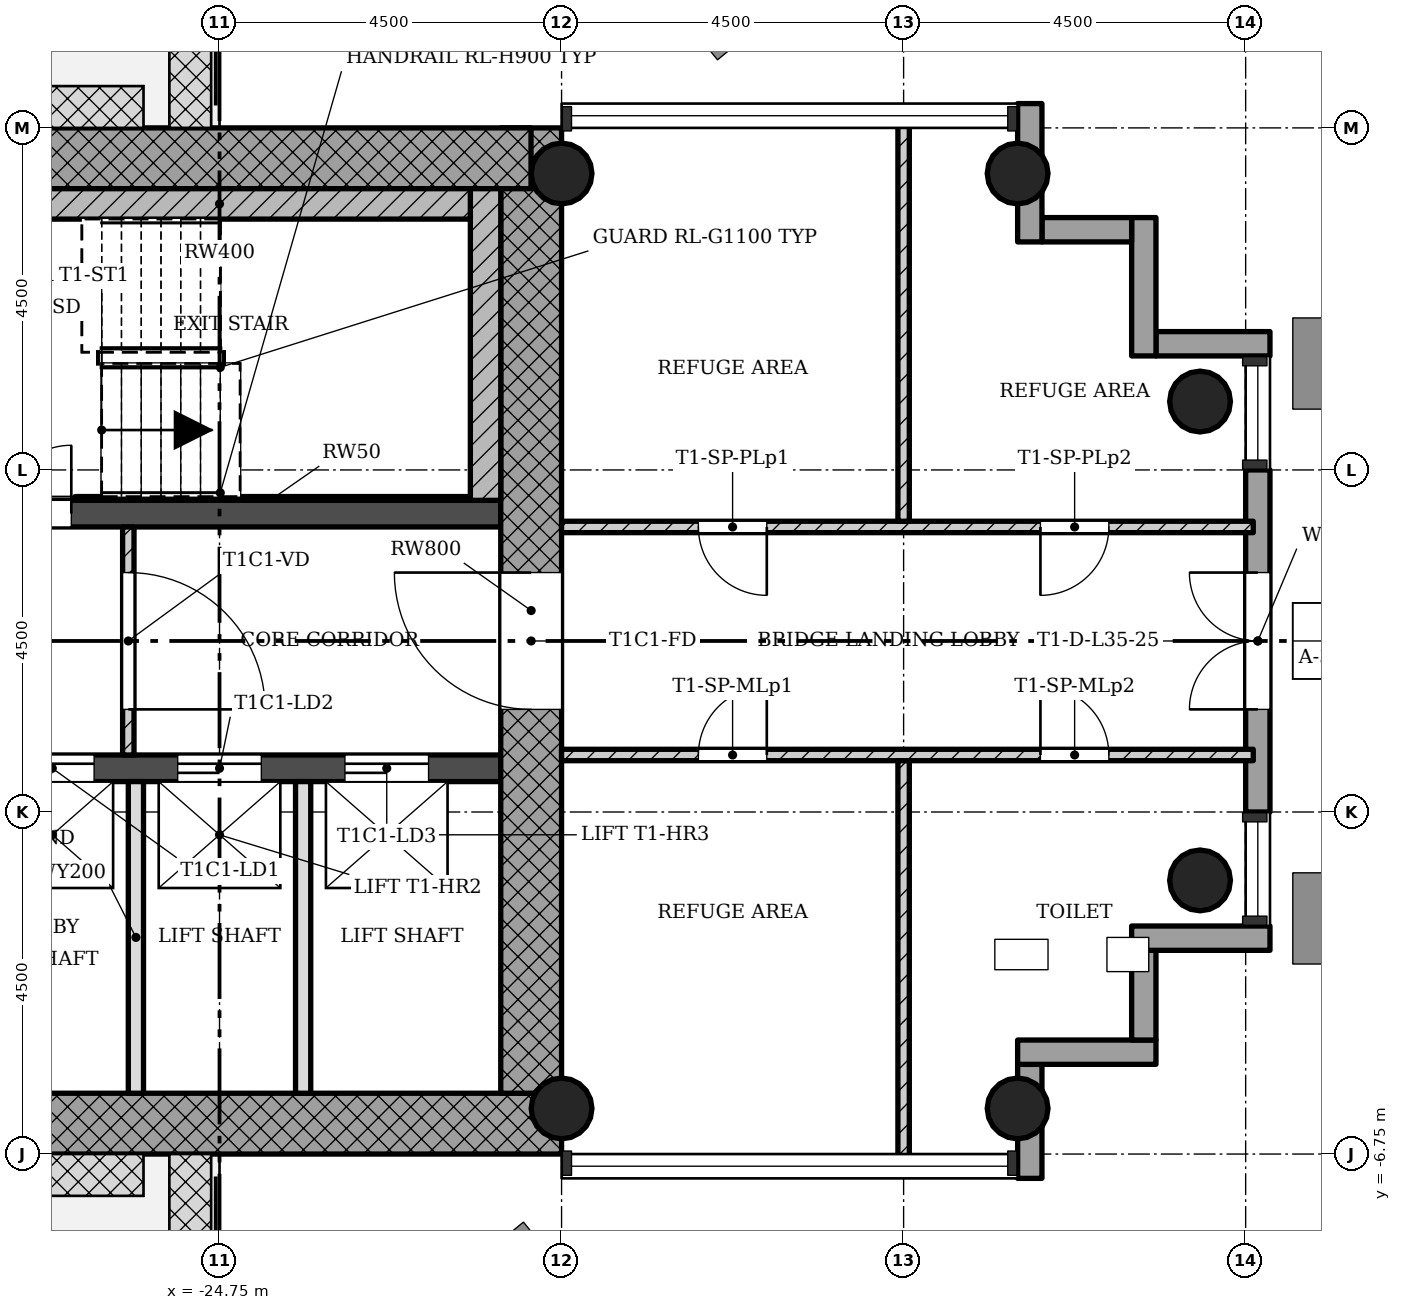
"""IFC4 building model, lengths in metres.
Left out: names, types, materials, properties, quantities, classifications, styles, units other than length and angle.
Written with IfcOpenShell. Run it as: python <this file> out.ifc"""

import sys

from ifc_helpers import new_model, si_unit, direction, frame, frame_2d, origin, origin_2d, place, context, subcontext, project, spatial, rectangle, hollow_circle, extrude, element, fill, save


model = new_model("IFC4")
c1 = context("Model", 3, precision=1e-05, world=origin(), true_north=direction((0.0, 1.0)))
c2 = subcontext(c1, "Body", "Model", "MODEL_VIEW")
j1 = project(units=[si_unit("LENGTHUNIT", "METRE"), si_unit("PLANEANGLEUNIT", "RADIAN")], contexts=[c1])
p1 = place(None, origin())
s1 = spatial("IfcSite", under=j1, at=p1, CompositionType="ELEMENT")
p2 = place(p1, origin())
s2 = spatial("IfcBuilding", under=s1, at=p2, CompositionType="ELEMENT")
p3 = place(p2, frame((0.0, 0.0, 128.7)))
s3 = spatial("IfcBuildingStorey", under=s2, at=p3, CompositionType="ELEMENT", Elevation=128.7)
p4 = place(p3, frame((-28.45, -6.35, 0.0), z_axis=(0.0, 0.0, 1.0), x_axis=(1.0, 0.0, 0.0)))
e1 = element("IfcWall", 1, at=p4, inside=s3, PredefinedType="SHEAR", context=c2, shape_type="SweptSolid", body=[
    extrude(rectangle(XDim=8.2, YDim=0.8, at=frame_2d((4.1, 0.0))), origin(), (0.0, 0.0, 1.0), 5.0),
])
p5 = place(p3, frame((-20.65, -5.95, 0.0), z_axis=(0.0, 0.0, 1.0), x_axis=(0.0, 1.0, 0.0)))
e2 = element("IfcWall", 2, at=p5, inside=s3, PredefinedType="SHEAR", context=c2, shape_type="SweptSolid", body=[
    extrude(rectangle(XDim=12.7, YDim=0.8, at=frame_2d((6.35, 0.0))), origin(), (0.0, 0.0, 1.0), 5.0),
])
p6 = place(p5, frame((5.05, 0.0, 0.0)))
e3 = element("IfcOpeningElement", 3, at=p6, cuts=e2, PredefinedType="OPENING", context=c2, shape_type="SweptSolid", body=[
    extrude(rectangle(XDim=1.8, YDim=2.1, at=frame_2d((0.9, 1.05))), frame((0.0, 0.41, 0.0), z_axis=(0.0, -1.0, 0.0), x_axis=(1.0, 0.0, 0.0)), (0.0, 0.0, 1.0), 0.82),
])
p7 = place(p3, frame((-20.652, 6.35, 0.0), z_axis=(0.0, 0.0, 1.0), x_axis=(-1.0, 0.0, 0.0)))
e4 = element("IfcWall", 4, at=p7, inside=s3, PredefinedType="SHEAR", context=c2, shape_type="SweptSolid", body=[
    extrude(rectangle(XDim=8.796, YDim=0.8, at=frame_2d((4.398, 0.0))), origin(), (0.0, 0.0, 1.0), 5.0),
])
p8 = place(p3, frame((-28.45, -1.675, 0.0), z_axis=(0.0, 0.0, 1.0), x_axis=(1.0, 0.0, 0.0)))
e5 = element("IfcWall", 5, at=p8, inside=s3, PredefinedType="SHEAR", context=c2, shape_type="SweptSolid", body=[
    extrude(rectangle(XDim=7.4, YDim=0.35, at=frame_2d((3.7, 0.0))), origin(), (0.0, 0.0, 1.0), 5.0),
])
p9 = place(p8, frame((0.95, 0.0, 0.0)))
e6 = element("IfcOpeningElement", 6, at=p9, cuts=e5, PredefinedType="OPENING", context=c2, shape_type="SweptSolid", body=[
    extrude(rectangle(XDim=1.1, YDim=2.1, at=frame_2d((0.55, 1.05))), frame((0.0, 0.185, 0.0), z_axis=(0.0, -1.0, 0.0), x_axis=(1.0, 0.0, 0.0)), (0.0, 0.0, 1.0), 0.37),
])
p10 = place(p8, frame((3.15, 0.0, 0.0)))
e7 = element("IfcOpeningElement", 7, at=p10, cuts=e5, PredefinedType="OPENING", context=c2, shape_type="SweptSolid", body=[
    extrude(rectangle(XDim=1.1, YDim=2.1, at=frame_2d((0.55, 1.05))), frame((0.0, 0.185, 0.0), z_axis=(0.0, -1.0, 0.0), x_axis=(1.0, 0.0, 0.0)), (0.0, 0.0, 1.0), 0.37),
])
p11 = place(p8, frame((5.35, 0.0, 0.0)))
e8 = element("IfcOpeningElement", 8, at=p11, cuts=e5, PredefinedType="OPENING", context=c2, shape_type="SweptSolid", body=[
    extrude(rectangle(XDim=1.1, YDim=2.1, at=frame_2d((0.55, 1.05))), frame((0.0, 0.185, 0.0), z_axis=(0.0, -1.0, 0.0), x_axis=(1.0, 0.0, 0.0)), (0.0, 0.0, 1.0), 0.37),
])
p12 = place(p3, frame((-28.45, 1.675, 0.0), z_axis=(0.0, 0.0, 1.0), x_axis=(1.0, 0.0, 0.0)))
e9 = element("IfcWall", 9, at=p12, inside=s3, PredefinedType="SHEAR", context=c2, shape_type="SweptSolid", body=[
    extrude(rectangle(XDim=7.4, YDim=0.35, at=frame_2d((3.7, 0.0))), origin(), (0.0, 0.0, 1.0), 5.0),
])
p13 = place(p12, frame((0.85, 0.0, 0.0)))
e10 = element("IfcOpeningElement", 10, at=p13, cuts=e9, PredefinedType="OPENING", context=c2, shape_type="SweptSolid", body=[
    extrude(rectangle(XDim=0.9, YDim=2.1, at=frame_2d((0.45, 1.05))), frame((0.0, 0.185, 0.0), z_axis=(0.0, -1.0, 0.0), x_axis=(1.0, 0.0, 0.0)), (0.0, 0.0, 1.0), 0.37),
])
for number, where, z_axis, x_axis in (
    (11, (-20.25, -6.15, 0.0), (0.0, 0.0, 1.0), (1.0, 0.0, 0.0)),
    (12, (-20.25, 6.15, 0.0), (0.0, 0.0, 1.0), (1.0, 0.0, 0.0)),
    (13, (-14.25, -6.15, 0.0), (0.0, 0.0, 1.0), (1.0, 0.0, 0.0)),
    (14, (-14.25, 6.15, 0.0), (0.0, 0.0, 1.0), (1.0, 0.0, 0.0)),
    (15, (-11.85, -3.15, 0.0), (0.0, 0.0, 1.0), (1.0, 0.0, 0.0)),
    (16, (-11.85, 3.15, 0.0), (0.0, 0.0, 1.0), (1.0, 0.0, 0.0)),
):
    element("IfcColumn", number, at=place(p3, frame(where, z_axis=z_axis, x_axis=x_axis)), inside=s3, PredefinedType="COLUMN", context=c2, shape_type="SweptSolid", body=[
        extrude(hollow_circle(Radius=0.4, WallThickness=0.028, at=origin_2d()), origin(), (0.0, 0.0, 1.0), 5.0),
    ])
p14 = place(p3, frame((-14.09, -7.07, -0.3), z_axis=(0.0, 0.0, 1.0), x_axis=(0.0, 1.0, 0.0)))
e17 = element("IfcWall", 17, at=p14, inside=s3, PredefinedType="STANDARD", context=c2, shape_type="SweptSolid", body=[
    extrude(rectangle(XDim=1.5, YDim=0.32, at=frame_2d((0.75, 0.0))), origin(), (0.0, 0.0, 1.0), 5.0),
])
p15 = place(p3, frame((-14.25, -5.41, -0.3), z_axis=(0.0, 0.0, 1.0), x_axis=(1.0, 0.0, 0.0)))
e18 = element("IfcWall", 18, at=p15, inside=s3, PredefinedType="STANDARD", context=c2, shape_type="SweptSolid", body=[
    extrude(rectangle(XDim=1.82, YDim=0.32, at=frame_2d((0.91, 0.0))), origin(), (0.0, 0.0, 1.0), 5.0),
])
p16 = place(p3, frame((-12.59, -5.25, -0.3), z_axis=(0.0, 0.0, 1.0), x_axis=(0.0, 1.0, 0.0)))
e19 = element("IfcWall", 19, at=p16, inside=s3, PredefinedType="STANDARD", context=c2, shape_type="SweptSolid", body=[
    extrude(rectangle(XDim=1.18, YDim=0.32, at=frame_2d((0.59, 0.0))), origin(), (0.0, 0.0, 1.0), 5.0),
])
p17 = place(p3, frame((-12.75, -3.91, -0.3), z_axis=(0.0, 0.0, 1.0), x_axis=(1.0, 0.0, 0.0)))
e20 = element("IfcWall", 20, at=p17, inside=s3, PredefinedType="STANDARD", context=c2, shape_type="SweptSolid", body=[
    extrude(rectangle(XDim=1.82, YDim=0.32, at=frame_2d((0.91, 0.0))), origin(), (0.0, 0.0, 1.0), 5.0),
])
p18 = place(p3, frame((-11.09, -2.25, 0.0), z_axis=(0.0, 0.0, 1.0), x_axis=(0.0, 1.0, 0.0)))
e21 = element("IfcWall", 21, at=p18, inside=s3, PredefinedType="STANDARD", context=c2, shape_type="SweptSolid", body=[
    extrude(rectangle(XDim=4.5, YDim=0.32, at=frame_2d((2.25, 0.0))), origin(), (0.0, 0.0, 1.0), 4.7),
])
p19 = place(p18, frame((1.35, 0.0, 0.0)))
e22 = element("IfcOpeningElement", 22, at=p19, cuts=e21, PredefinedType="OPENING", context=c2, shape_type="SweptSolid", body=[
    extrude(rectangle(XDim=1.8, YDim=2.1, at=frame_2d((0.9, 1.05))), frame((0.0, 0.17, 0.0), z_axis=(0.0, -1.0, 0.0), x_axis=(1.0, 0.0, 0.0)), (0.0, 0.0, 1.0), 0.34),
])
p20 = place(p3, frame((-10.93, 3.91, -0.3), z_axis=(0.0, 0.0, 1.0), x_axis=(-1.0, 0.0, 0.0)))
e23 = element("IfcWall", 23, at=p20, inside=s3, PredefinedType="STANDARD", context=c2, shape_type="SweptSolid", body=[
    extrude(rectangle(XDim=1.5, YDim=0.32, at=frame_2d((0.75, 0.0))), origin(), (0.0, 0.0, 1.0), 5.0),
])
p21 = place(p3, frame((-12.59, 3.75, -0.3), z_axis=(0.0, 0.0, 1.0), x_axis=(0.0, 1.0, 0.0)))
e24 = element("IfcWall", 24, at=p21, inside=s3, PredefinedType="STANDARD", context=c2, shape_type="SweptSolid", body=[
    extrude(rectangle(XDim=1.82, YDim=0.32, at=frame_2d((0.91, 0.0))), origin(), (0.0, 0.0, 1.0), 5.0),
])
p22 = place(p3, frame((-12.75, 5.41, -0.3), z_axis=(0.0, 0.0, 1.0), x_axis=(-1.0, 0.0, 0.0)))
e25 = element("IfcWall", 25, at=p22, inside=s3, PredefinedType="STANDARD", context=c2, shape_type="SweptSolid", body=[
    extrude(rectangle(XDim=1.18, YDim=0.32, at=frame_2d((0.59, 0.0))), origin(), (0.0, 0.0, 1.0), 5.0),
])
p23 = place(p3, frame((-14.09, 5.25, -0.3), z_axis=(0.0, 0.0, 1.0), x_axis=(0.0, 1.0, 0.0)))
e26 = element("IfcWall", 26, at=p23, inside=s3, PredefinedType="STANDARD", context=c2, shape_type="SweptSolid", body=[
    extrude(rectangle(XDim=1.82, YDim=0.32, at=frame_2d((0.91, 0.0))), origin(), (0.0, 0.0, 1.0), 5.0),
])
p24 = place(p3, frame((-25.95, -1.5, 0.0), z_axis=(0.0, 0.0, 1.0), x_axis=(0.0, 1.0, 0.0)))
e27 = element("IfcWall", 27, at=p24, inside=s3, PredefinedType="PARTITIONING", context=c2, shape_type="SweptSolid", body=[
    extrude(rectangle(XDim=3.0, YDim=0.15, at=frame_2d((1.5, 0.0))), origin(), (0.0, 0.0, 1.0), 4.58),
])
p25 = place(p24, frame((0.6, 0.0, 0.0)))
e28 = element("IfcOpeningElement", 28, at=p25, cuts=e27, PredefinedType="OPENING", context=c2, shape_type="SweptSolid", body=[
    extrude(rectangle(XDim=1.8, YDim=2.1, at=frame_2d((0.9, 1.05))), frame((0.0, 0.085, 0.0), z_axis=(0.0, -1.0, 0.0), x_axis=(1.0, 0.0, 0.0)), (0.0, 0.0, 1.0), 0.17),
])
for number, where, z_axis, x_axis in (
    (29, (-25.85, -5.95, 0.0), (0.0, 0.0, 1.0), (0.0, 1.0, 0.0)),
    (30, (-23.65, -5.95, 0.0), (0.0, 0.0, 1.0), (0.0, 1.0, 0.0)),
):
    element("IfcWall", number, at=place(p3, frame(where, z_axis=z_axis, x_axis=x_axis)), inside=s3, PredefinedType="SOLIDWALL", context=c2, shape_type="SweptSolid", body=[
        extrude(rectangle(XDim=4.1, YDim=0.2, at=frame_2d((2.05, 0.0))), origin(), (0.0, 0.0, 1.0), 4.58),
    ])
p26 = place(p3, frame((-20.25, 1.5, 0.0), z_axis=(0.0, 0.0, 1.0), x_axis=(1.0, 0.0, 0.0)))
e31 = element("IfcWall", 31, at=p26, inside=s3, PredefinedType="PARTITIONING", context=c2, shape_type="SweptSolid", body=[
    extrude(rectangle(XDim=9.1, YDim=0.15, at=frame_2d((4.55, 0.0))), origin(), (0.0, 0.0, 1.0), 4.58),
])
p27 = place(p26, frame((1.8, 0.0, 0.0)))
e32 = element("IfcOpeningElement", 32, at=p27, cuts=e31, PredefinedType="OPENING", context=c2, shape_type="SweptSolid", body=[
    extrude(rectangle(XDim=0.9, YDim=2.1, at=frame_2d((0.45, 1.05))), frame((0.0, 0.085, 0.0), z_axis=(0.0, -1.0, 0.0), x_axis=(1.0, 0.0, 0.0)), (0.0, 0.0, 1.0), 0.17),
])
p28 = place(p26, frame((6.3, 0.0, 0.0)))
e33 = element("IfcOpeningElement", 33, at=p28, cuts=e31, PredefinedType="OPENING", context=c2, shape_type="SweptSolid", body=[
    extrude(rectangle(XDim=0.9, YDim=2.1, at=frame_2d((0.45, 1.05))), frame((0.0, 0.085, 0.0), z_axis=(0.0, -1.0, 0.0), x_axis=(1.0, 0.0, 0.0)), (0.0, 0.0, 1.0), 0.17),
])
p29 = place(p3, frame((-15.75, 1.575, 0.0), z_axis=(0.0, 0.0, 1.0), x_axis=(0.0, 1.0, 0.0)))
e34 = element("IfcWall", 34, at=p29, inside=s3, PredefinedType="PARTITIONING", context=c2, shape_type="SweptSolid", body=[
    extrude(rectangle(XDim=5.275, YDim=0.15, at=frame_2d((2.638, 0.0))), origin(), (0.0, 0.0, 1.0), 4.58),
])
p30 = place(p3, frame((-20.25, -1.5, 0.0), z_axis=(0.0, 0.0, 1.0), x_axis=(1.0, 0.0, 0.0)))
e35 = element("IfcWall", 35, at=p30, inside=s3, PredefinedType="PARTITIONING", context=c2, shape_type="SweptSolid", body=[
    extrude(rectangle(XDim=9.1, YDim=0.15, at=frame_2d((4.55, 0.0))), origin(), (0.0, 0.0, 1.0), 4.58),
])
p31 = place(p30, frame((1.8, 0.0, 0.0)))
e36 = element("IfcOpeningElement", 36, at=p31, cuts=e35, PredefinedType="OPENING", context=c2, shape_type="SweptSolid", body=[
    extrude(rectangle(XDim=0.9, YDim=2.1, at=frame_2d((0.45, 1.05))), frame((0.0, 0.085, 0.0), z_axis=(0.0, -1.0, 0.0), x_axis=(1.0, 0.0, 0.0)), (0.0, 0.0, 1.0), 0.17),
])
p32 = place(p30, frame((6.3, 0.0, 0.0)))
e37 = element("IfcOpeningElement", 37, at=p32, cuts=e35, PredefinedType="OPENING", context=c2, shape_type="SweptSolid", body=[
    extrude(rectangle(XDim=0.9, YDim=2.1, at=frame_2d((0.45, 1.05))), frame((0.0, 0.085, 0.0), z_axis=(0.0, -1.0, 0.0), x_axis=(1.0, 0.0, 0.0)), (0.0, 0.0, 1.0), 0.17),
])
p33 = place(p3, frame((-15.75, -1.575, 0.0), z_axis=(0.0, 0.0, 1.0), x_axis=(0.0, -1.0, 0.0)))
e38 = element("IfcWall", 38, at=p33, inside=s3, PredefinedType="PARTITIONING", context=c2, shape_type="SweptSolid", body=[
    extrude(rectangle(XDim=5.275, YDim=0.15, at=frame_2d((2.638, 0.0))), origin(), (0.0, 0.0, 1.0), 4.58),
])
p34 = place(p3, frame((-21.25, 1.85, 0.0), z_axis=(0.0, 0.0, 1.0), x_axis=(0.0, 1.0, 0.0)))
e39 = element("IfcWall", 39, at=p34, inside=s3, PredefinedType="SHEAR", context=c2, shape_type="SweptSolid", body=[
    extrude(rectangle(XDim=4.1, YDim=0.4, at=frame_2d((2.05, 0.0))), origin(), (0.0, 0.0, 1.0), 5.0),
])
p35 = place(p3, frame((-28.05, 5.75, 0.0), z_axis=(0.0, 0.0, 1.0), x_axis=(1.0, 0.0, 0.0)))
e40 = element("IfcWall", 40, at=p35, inside=s3, PredefinedType="SHEAR", context=c2, shape_type="SweptSolid", body=[
    extrude(rectangle(XDim=6.6, YDim=0.4, at=frame_2d((3.3, 0.0))), origin(), (0.0, 0.0, 1.0), 5.0),
])
p36 = place(p3, frame((-26.65, 1.875, 0.0), z_axis=(0.0, 0.0, 1.0), x_axis=(1.0, 0.0, 0.0)))
e41 = element("IfcWall", 41, at=p36, inside=s3, PredefinedType="SHEAR", context=c2, shape_type="SweptSolid", body=[
    extrude(rectangle(XDim=5.2, YDim=0.05, at=frame_2d((2.6, 0.0))), origin(), (0.0, 0.0, 1.0), 5.0),
])
p37 = place(p19, origin())
e42 = element("IfcDoor", 42, at=p37, inside=s3, OperationType="DOUBLE_DOOR_SINGLE_SWING", PredefinedType="DOOR", context=c2, shape_type="SweptSolid", body=[
    extrude(rectangle(XDim=1.8, YDim=2.1, at=frame_2d((0.9, 1.05))), frame((0.0, 0.025, 0.0), z_axis=(0.0, -1.0, 0.0), x_axis=(1.0, 0.0, 0.0)), (0.0, 0.0, 1.0), 0.05),
])
fill(e22, e42)
p38 = place(p25, origin())
e43 = element("IfcDoor", 43, at=p38, inside=s3, OperationType="SINGLE_SWING_LEFT", PredefinedType="DOOR", context=c2, shape_type="SweptSolid", body=[
    extrude(rectangle(XDim=1.8, YDim=2.1, at=frame_2d((0.9, 1.05))), frame((0.0, 0.025, 0.0), z_axis=(0.0, -1.0, 0.0), x_axis=(1.0, 0.0, 0.0)), (0.0, 0.0, 1.0), 0.05),
])
fill(e28, e43)
p39 = place(p27, origin())
e44 = element("IfcDoor", 44, at=p39, inside=s3, OperationType="SINGLE_SWING_RIGHT", PredefinedType="DOOR", context=c2, shape_type="SweptSolid", body=[
    extrude(rectangle(XDim=0.9, YDim=2.1, at=frame_2d((0.45, 1.05))), frame((0.0, 0.025, 0.0), z_axis=(0.0, -1.0, 0.0), x_axis=(1.0, 0.0, 0.0)), (0.0, 0.0, 1.0), 0.05),
])
fill(e32, e44)
p40 = place(p28, origin())
e45 = element("IfcDoor", 45, at=p40, inside=s3, OperationType="SINGLE_SWING_LEFT", PredefinedType="DOOR", context=c2, shape_type="SweptSolid", body=[
    extrude(rectangle(XDim=0.9, YDim=2.1, at=frame_2d((0.45, 1.05))), frame((0.0, 0.025, 0.0), z_axis=(0.0, -1.0, 0.0), x_axis=(1.0, 0.0, 0.0)), (0.0, 0.0, 1.0), 0.05),
])
fill(e33, e45)
p41 = place(p31, origin())
e46 = element("IfcDoor", 46, at=p41, inside=s3, OperationType="SINGLE_SWING_LEFT", PredefinedType="DOOR", context=c2, shape_type="SweptSolid", body=[
    extrude(rectangle(XDim=0.9, YDim=2.1, at=frame_2d((0.45, 1.05))), frame((0.0, 0.025, 0.0), z_axis=(0.0, -1.0, 0.0), x_axis=(1.0, 0.0, 0.0)), (0.0, 0.0, 1.0), 0.05),
])
fill(e36, e46)
p42 = place(p32, origin())
e47 = element("IfcDoor", 47, at=p42, inside=s3, OperationType="SINGLE_SWING_RIGHT", PredefinedType="DOOR", context=c2, shape_type="SweptSolid", body=[
    extrude(rectangle(XDim=0.9, YDim=2.1, at=frame_2d((0.45, 1.05))), frame((0.0, 0.025, 0.0), z_axis=(0.0, -1.0, 0.0), x_axis=(1.0, 0.0, 0.0)), (0.0, 0.0, 1.0), 0.05),
])
fill(e37, e47)
p43 = place(p13, origin())
e48 = element("IfcDoor", 48, at=p43, inside=s3, OperationType="SINGLE_SWING_LEFT", PredefinedType="DOOR", context=c2, shape_type="SweptSolid", body=[
    extrude(rectangle(XDim=0.9, YDim=2.1, at=frame_2d((0.45, 1.05))), frame((0.0, 0.025, 0.0), z_axis=(0.0, -1.0, 0.0), x_axis=(1.0, 0.0, 0.0)), (0.0, 0.0, 1.0), 0.05),
])
fill(e10, e48)
p44 = place(p9, origin())
e49 = element("IfcDoor", 49, at=p44, inside=s3, OperationType="SLIDING_TO_LEFT", PredefinedType="DOOR", context=c2, shape_type="SweptSolid", body=[
    extrude(rectangle(XDim=1.1, YDim=2.1, at=frame_2d((0.55, 1.05))), frame((0.0, 0.025, 0.0), z_axis=(0.0, -1.0, 0.0), x_axis=(1.0, 0.0, 0.0)), (0.0, 0.0, 1.0), 0.05),
])
fill(e6, e49)
p45 = place(p10, origin())
e50 = element("IfcDoor", 50, at=p45, inside=s3, OperationType="SLIDING_TO_LEFT", PredefinedType="DOOR", context=c2, shape_type="SweptSolid", body=[
    extrude(rectangle(XDim=1.1, YDim=2.1, at=frame_2d((0.55, 1.05))), frame((0.0, 0.025, 0.0), z_axis=(0.0, -1.0, 0.0), x_axis=(1.0, 0.0, 0.0)), (0.0, 0.0, 1.0), 0.05),
])
fill(e7, e50)
p46 = place(p11, origin())
e51 = element("IfcDoor", 51, at=p46, inside=s3, OperationType="SLIDING_TO_LEFT", PredefinedType="DOOR", context=c2, shape_type="SweptSolid", body=[
    extrude(rectangle(XDim=1.1, YDim=2.1, at=frame_2d((0.55, 1.05))), frame((0.0, 0.025, 0.0), z_axis=(0.0, -1.0, 0.0), x_axis=(1.0, 0.0, 0.0)), (0.0, 0.0, 1.0), 0.05),
])
fill(e8, e51)
p47 = place(p6, origin())
e52 = element("IfcDoor", 52, at=p47, inside=s3, OperationType="SINGLE_SWING_LEFT", PredefinedType="DOOR", context=c2, shape_type="SweptSolid", body=[
    extrude(rectangle(XDim=1.8, YDim=2.1, at=frame_2d((0.9, 1.05))), frame((0.0, 0.025, 0.0), z_axis=(0.0, -1.0, 0.0), x_axis=(1.0, 0.0, 0.0)), (0.0, 0.0, 1.0), 0.05),
])
fill(e3, e52)
save(model, sys.argv[1])
